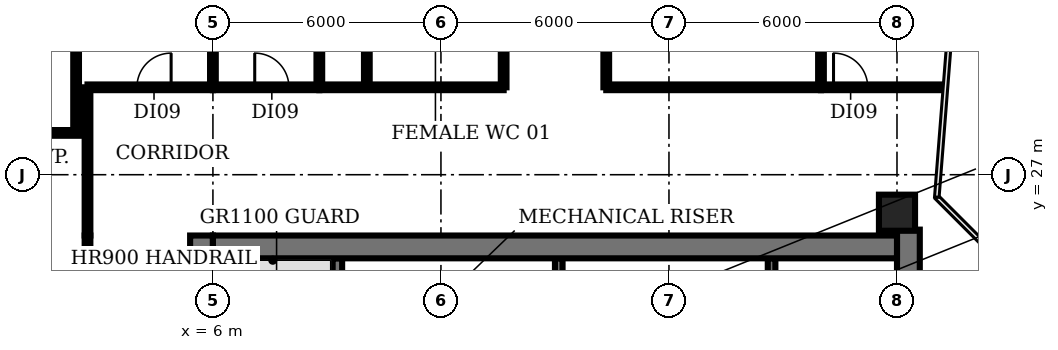
"""IFC4 building model, lengths in metres.
Left out: names, types, materials, properties, quantities, classifications, styles, units other than length and angle.
Written with IfcOpenShell. Run it as: python <this file> out.ifc"""

import sys

from ifc_helpers import new_model, si_unit, direction, frame, frame_2d, origin, origin_2d, place, context, subcontext, project, spatial, rectangle, circle, extrude, element, fill, save


model = new_model("IFC4")
c1 = context("Model", 3, precision=1e-05, world=origin(), true_north=direction((0.0, 1.0)))
c2 = subcontext(c1, "Body", "Model", "MODEL_VIEW")
j1 = project(units=[si_unit("LENGTHUNIT", "METRE"), si_unit("PLANEANGLEUNIT", "RADIAN")], contexts=[c1])
p1 = place(None, origin())
s1 = spatial("IfcSite", under=j1, at=p1, CompositionType="ELEMENT")
p2 = place(p1, origin())
s2 = spatial("IfcBuilding", under=s1, at=p2, CompositionType="ELEMENT")
p3 = place(p2, frame((0.0, 0.0, 150.8)))
s3 = spatial("IfcBuildingStorey", under=s2, at=p3, CompositionType="ELEMENT", Elevation=150.8)
p4 = place(p3, frame((24.0, 26.0, 0.0), z_axis=(0.0, 0.0, 1.0), x_axis=(1.0, 0.0, 0.0)))
e1 = element("IfcColumn", 1, at=p4, inside=s3, PredefinedType="COLUMN", context=c2, shape_type="SweptSolid", body=[
    extrude(circle(Radius=0.475, at=origin_2d()), origin(), (0.0, 0.0, 1.0), 3.85),
])
p5 = place(p3, frame((9.275, 18.375, 0.0), z_axis=(0.0, 0.0, 1.0), x_axis=(0.0, 1.0, 0.0)))
e2 = element("IfcWall", 2, at=p5, inside=s3, PredefinedType="SHEAR", context=c2, shape_type="SweptSolid", body=[
    extrude(rectangle(XDim=6.425, YDim=0.25, at=frame_2d((3.212, 0.0))), origin(), (0.0, 0.0, 1.0), 3.85),
])
for number, where, z_axis, x_axis in (
    (3, (15.1, 22.9, 0.0), (0.0, 0.0, 1.0), (0.0, 1.0, 0.0)),
    (4, (20.7, 22.9, 0.0), (0.0, 0.0, 1.0), (0.0, 1.0, 0.0)),
):
    element("IfcWall", number, at=place(p3, frame(where, z_axis=z_axis, x_axis=x_axis)), inside=s3, PredefinedType="SHEAR", context=c2, shape_type="SweptSolid", body=[
        extrude(rectangle(XDim=1.9, YDim=0.2, at=frame_2d((0.95, 0.0))), origin(), (0.0, 0.0, 1.0), 3.85),
    ])
p6 = place(p3, frame((5.7, 4.8, 0.0), z_axis=(0.0, 0.0, 1.0), x_axis=(0.0, 1.0, 0.0)))
e5 = element("IfcWall", 5, at=p6, inside=s3, PredefinedType="SHEAR", context=c2, shape_type="SweptSolid", body=[
    extrude(rectangle(XDim=20.6, YDim=0.6, at=frame_2d((10.3, 0.0))), origin(), (0.0, 0.0, 1.0), 3.85),
])
p7 = place(p6, frame((0.85, 0.0, 0.0)))
e6 = element("IfcOpeningElement", 6, at=p7, cuts=e5, PredefinedType="OPENING", context=c2, shape_type="SweptSolid", body=[
    extrude(rectangle(XDim=1.5, YDim=2.1, at=frame_2d((0.75, 1.05))), frame((0.0, 0.31, 0.0), z_axis=(0.0, -1.0, 0.0), x_axis=(1.0, 0.0, 0.0)), (0.0, 0.0, 1.0), 0.62),
])
p8 = place(p6, frame((7.3, 0.0, 0.0)))
e7 = element("IfcOpeningElement", 7, at=p8, cuts=e5, PredefinedType="OPENING", context=c2, shape_type="SweptSolid", body=[
    extrude(rectangle(XDim=1.2, YDim=2.1, at=frame_2d((0.6, 1.05))), frame((0.0, 0.31, 0.0), z_axis=(0.0, -1.0, 0.0), x_axis=(1.0, 0.0, 0.0)), (0.0, 0.0, 1.0), 0.62),
])
p9 = place(p6, frame((13.85, 0.0, 0.0)))
e8 = element("IfcOpeningElement", 8, at=p9, cuts=e5, PredefinedType="OPENING", context=c2, shape_type="SweptSolid", body=[
    extrude(rectangle(XDim=1.2, YDim=2.1, at=frame_2d((0.6, 1.05))), frame((0.0, 0.31, 0.0), z_axis=(0.0, -1.0, 0.0), x_axis=(1.0, 0.0, 0.0)), (0.0, 0.0, 1.0), 0.62),
])
p10 = place(p3, frame((24.3, 25.555, 0.0), z_axis=(0.0, 0.0, 1.0), x_axis=(0.0, -1.0, 0.0)))
e9 = element("IfcWall", 9, at=p10, inside=s3, PredefinedType="SHEAR", context=c2, shape_type="SweptSolid", body=[
    extrude(rectangle(XDim=20.755, YDim=0.6, at=frame_2d((10.377, 0.0))), origin(), (0.0, 0.0, 1.0), 3.85),
])
p11 = place(p10, frame((18.405, 0.0, 0.0)))
e10 = element("IfcOpeningElement", 10, at=p11, cuts=e9, PredefinedType="OPENING", context=c2, shape_type="SweptSolid", body=[
    extrude(rectangle(XDim=1.5, YDim=2.1, at=frame_2d((0.75, 1.05))), frame((0.0, 0.31, 0.0), z_axis=(0.0, -1.0, 0.0), x_axis=(1.0, 0.0, 0.0)), (0.0, 0.0, 1.0), 0.62),
])
p12 = place(p10, frame((12.305, 0.0, 0.0)))
e11 = element("IfcOpeningElement", 11, at=p12, cuts=e9, PredefinedType="OPENING", context=c2, shape_type="SweptSolid", body=[
    extrude(rectangle(XDim=0.9, YDim=2.1, at=frame_2d((0.45, 1.05))), frame((0.0, 0.31, 0.0), z_axis=(0.0, -1.0, 0.0), x_axis=(1.0, 0.0, 0.0)), (0.0, 0.0, 1.0), 0.62),
])
p13 = place(p10, frame((6.305, 0.0, 0.0)))
e12 = element("IfcOpeningElement", 12, at=p13, cuts=e9, PredefinedType="OPENING", context=c2, shape_type="SweptSolid", body=[
    extrude(rectangle(XDim=2.0, YDim=2.1, at=frame_2d((1.0, 1.05))), frame((0.0, 0.31, 0.0), z_axis=(0.0, -1.0, 0.0), x_axis=(1.0, 0.0, 0.0)), (0.0, 0.0, 1.0), 0.62),
])
p14 = place(p3, frame((6.0, 25.1, 0.0), z_axis=(0.0, 0.0, 1.0), x_axis=(1.0, 0.0, 0.0)))
e13 = element("IfcWall", 13, at=p14, inside=s3, PredefinedType="SHEAR", context=c2, shape_type="SweptSolid", body=[
    extrude(rectangle(XDim=18.0, YDim=0.6, at=frame_2d((9.0, 0.0))), origin(), (0.0, 0.0, 1.0), 3.85),
])
p15 = place(p3, frame((-0.98, 28.1, 0.0), z_axis=(0.0, 0.0, 1.0), x_axis=(1.0, 0.0, 0.0)))
e14 = element("IfcWall", 14, at=p15, inside=s3, PredefinedType="PARTITIONING", context=c2, shape_type="SweptSolid", body=[
    extrude(rectangle(XDim=3.68, YDim=0.15, at=frame_2d((1.84, 0.0))), origin(), (0.0, 0.0, 1.0), 2.88),
])
p16 = place(p3, frame((2.4, 28.1, 0.0), z_axis=(0.0, 0.0, 1.0), x_axis=(0.0, 1.0, 0.0)))
e15 = element("IfcWall", 15, at=p16, inside=s3, PredefinedType="PARTITIONING", context=c2, shape_type="SweptSolid", body=[
    extrude(rectangle(XDim=6.0, YDim=0.15, at=frame_2d((3.0, 0.0))), origin(), (0.0, 0.0, 1.0), 2.88),
])
p17 = place(p3, frame((2.7, 4.8, 0.0), z_axis=(0.0, 0.0, 1.0), x_axis=(0.0, 1.0, 0.0)))
e16 = element("IfcWall", 16, at=p17, inside=s3, PredefinedType="PARTITIONING", context=c2, shape_type="SweptSolid", body=[
    extrude(rectangle(XDim=20.6, YDim=0.15, at=frame_2d((10.3, 0.0))), origin(), (0.0, 0.0, 1.0), 2.88),
])
p18 = place(p17, frame((10.2, 0.0, 0.0)))
e17 = element("IfcOpeningElement", 17, at=p18, cuts=e16, PredefinedType="OPENING", context=c2, shape_type="SweptSolid", body=[
    extrude(rectangle(XDim=1.2, YDim=2.1, at=frame_2d((0.6, 1.05))), frame((0.0, 0.085, 0.0), z_axis=(0.0, -1.0, 0.0), x_axis=(1.0, 0.0, 0.0)), (0.0, 0.0, 1.0), 0.17),
])
p19 = place(p3, frame((2.7, 25.4, 0.0), z_axis=(0.0, 0.0, 1.0), x_axis=(0.0, 1.0, 0.0)))
e18 = element("IfcWall", 18, at=p19, inside=s3, PredefinedType="PARTITIONING", context=c2, shape_type="SweptSolid", body=[
    extrude(rectangle(XDim=3.9, YDim=0.15, at=frame_2d((1.95, 0.0))), origin(), (0.0, 0.0, 1.0), 2.88),
])
p20 = place(p3, frame((2.7, 29.3, 0.0), z_axis=(0.0, 0.0, 1.0), x_axis=(1.0, 0.0, 0.0)))
e19 = element("IfcWall", 19, at=p20, inside=s3, PredefinedType="PARTITIONING", context=c2, shape_type="SweptSolid", body=[
    extrude(rectangle(XDim=3.3, YDim=0.15, at=frame_2d((1.65, 0.0))), origin(), (0.0, 0.0, 1.0), 2.88),
])
p21 = place(p20, frame((1.3, 0.0, 0.0)))
e20 = element("IfcOpeningElement", 20, at=p21, cuts=e19, PredefinedType="OPENING", context=c2, shape_type="SweptSolid", body=[
    extrude(rectangle(XDim=0.9, YDim=2.1, at=frame_2d((0.45, 1.05))), frame((0.0, 0.085, 0.0), z_axis=(0.0, -1.0, 0.0), x_axis=(1.0, 0.0, 0.0)), (0.0, 0.0, 1.0), 0.17),
])
p22 = place(p3, frame((6.0, 29.3, 0.0), z_axis=(0.0, 0.0, 1.0), x_axis=(0.0, 1.0, 0.0)))
e21 = element("IfcWall", 21, at=p22, inside=s3, PredefinedType="PARTITIONING", context=c2, shape_type="SweptSolid", body=[
    extrude(rectangle(XDim=4.8, YDim=0.15, at=frame_2d((2.4, 0.0))), origin(), (0.0, 0.0, 1.0), 2.88),
])
p23 = place(p3, frame((6.0, 29.3, 0.0), z_axis=(0.0, 0.0, 1.0), x_axis=(1.0, 0.0, 0.0)))
e22 = element("IfcWall", 22, at=p23, inside=s3, PredefinedType="PARTITIONING", context=c2, shape_type="SweptSolid", body=[
    extrude(rectangle(XDim=2.8, YDim=0.15, at=frame_2d((1.4, 0.0))), origin(), (0.0, 0.0, 1.0), 2.88),
])
p24 = place(p23, frame((1.1, 0.0, 0.0)))
e23 = element("IfcOpeningElement", 23, at=p24, cuts=e22, PredefinedType="OPENING", context=c2, shape_type="SweptSolid", body=[
    extrude(rectangle(XDim=0.9, YDim=2.1, at=frame_2d((0.45, 1.05))), frame((0.0, 0.085, 0.0), z_axis=(0.0, -1.0, 0.0), x_axis=(1.0, 0.0, 0.0)), (0.0, 0.0, 1.0), 0.17),
])
p25 = place(p3, frame((8.8, 29.3, 0.0), z_axis=(0.0, 0.0, 1.0), x_axis=(0.0, 1.0, 0.0)))
e24 = element("IfcWall", 24, at=p25, inside=s3, PredefinedType="PARTITIONING", context=c2, shape_type="SweptSolid", body=[
    extrude(rectangle(XDim=4.8, YDim=0.15, at=frame_2d((2.4, 0.0))), origin(), (0.0, 0.0, 1.0), 2.88),
])
p26 = place(p3, frame((8.8, 29.3, 0.0), z_axis=(0.0, 0.0, 1.0), x_axis=(1.0, 0.0, 0.0)))
e25 = element("IfcWall", 25, at=p26, inside=s3, PredefinedType="PARTITIONING", context=c2, shape_type="SweptSolid", body=[
    extrude(rectangle(XDim=4.85, YDim=0.15, at=frame_2d((2.425, 0.0))), origin(), (0.0, 0.0, 1.0), 2.88),
])
p27 = place(p3, frame((10.05, 29.3, 0.0), z_axis=(0.0, 0.0, 1.0), x_axis=(0.0, 1.0, 0.0)))
e26 = element("IfcWall", 26, at=p27, inside=s3, PredefinedType="PARTITIONING", context=c2, shape_type="SweptSolid", body=[
    extrude(rectangle(XDim=4.8, YDim=0.15, at=frame_2d((2.4, 0.0))), origin(), (0.0, 0.0, 1.0), 2.88),
])
p28 = place(p3, frame((13.65, 29.3, 0.0), z_axis=(0.0, 0.0, 1.0), x_axis=(0.0, 1.0, 0.0)))
e27 = element("IfcWall", 27, at=p28, inside=s3, PredefinedType="PARTITIONING", context=c2, shape_type="SweptSolid", body=[
    extrude(rectangle(XDim=4.8, YDim=0.15, at=frame_2d((2.4, 0.0))), origin(), (0.0, 0.0, 1.0), 2.88),
])
p29 = place(p28, frame((1.9, 0.0, 0.0)))
e28 = element("IfcOpeningElement", 28, at=p29, cuts=e27, PredefinedType="OPENING", context=c2, shape_type="SweptSolid", body=[
    extrude(rectangle(XDim=0.9, YDim=2.1, at=frame_2d((0.45, 1.05))), frame((0.0, 0.085, 0.0), z_axis=(0.0, -1.0, 0.0), x_axis=(1.0, 0.0, 0.0)), (0.0, 0.0, 1.0), 0.17),
])
p30 = place(p3, frame((16.35, 29.3, 0.0), z_axis=(0.0, 0.0, 1.0), x_axis=(0.0, 1.0, 0.0)))
e29 = element("IfcWall", 29, at=p30, inside=s3, PredefinedType="PARTITIONING", context=c2, shape_type="SweptSolid", body=[
    extrude(rectangle(XDim=4.8, YDim=0.15, at=frame_2d((2.4, 0.0))), origin(), (0.0, 0.0, 1.0), 2.88),
])
p31 = place(p3, frame((16.35, 29.3, 0.0), z_axis=(0.0, 0.0, 1.0), x_axis=(1.0, 0.0, 0.0)))
e30 = element("IfcWall", 30, at=p31, inside=s3, PredefinedType="PARTITIONING", context=c2, shape_type="SweptSolid", body=[
    extrude(rectangle(XDim=5.65, YDim=0.15, at=frame_2d((2.825, 0.0))), origin(), (0.0, 0.0, 1.0), 2.88),
])
p32 = place(p3, frame((22.0, 29.3, 0.0), z_axis=(0.0, 0.0, 1.0), x_axis=(0.0, 1.0, 0.0)))
e31 = element("IfcWall", 31, at=p32, inside=s3, PredefinedType="PARTITIONING", context=c2, shape_type="SweptSolid", body=[
    extrude(rectangle(XDim=4.8, YDim=0.15, at=frame_2d((2.4, 0.0))), origin(), (0.0, 0.0, 1.0), 2.88),
])
p33 = place(p3, frame((22.0, 29.3, 0.0), z_axis=(0.0, 0.0, 1.0), x_axis=(1.0, 0.0, 0.0)))
e32 = element("IfcWall", 32, at=p33, inside=s3, PredefinedType="PARTITIONING", context=c2, shape_type="SweptSolid", body=[
    extrude(rectangle(XDim=3.23, YDim=0.15, at=frame_2d((1.615, 0.0))), origin(), (0.0, 0.0, 1.0), 2.88),
])
p34 = place(p33, frame((0.33, 0.0, 0.0)))
e33 = element("IfcOpeningElement", 33, at=p34, cuts=e32, PredefinedType="OPENING", context=c2, shape_type="SweptSolid", body=[
    extrude(rectangle(XDim=0.9, YDim=2.1, at=frame_2d((0.45, 1.05))), frame((0.0, 0.085, 0.0), z_axis=(0.0, -1.0, 0.0), x_axis=(1.0, 0.0, 0.0)), (0.0, 0.0, 1.0), 0.17),
])
p35 = place(p21, origin())
e34 = element("IfcDoor", 34, at=p35, inside=s3, OperationType="SINGLE_SWING_RIGHT", PredefinedType="DOOR", context=c2, shape_type="SweptSolid", body=[
    extrude(rectangle(XDim=0.9, YDim=2.1, at=frame_2d((0.45, 1.05))), frame((0.0, 0.025, 0.0), z_axis=(0.0, -1.0, 0.0), x_axis=(1.0, 0.0, 0.0)), (0.0, 0.0, 1.0), 0.05),
])
fill(e20, e34)
p36 = place(p24, origin())
e35 = element("IfcDoor", 35, at=p36, inside=s3, OperationType="SINGLE_SWING_LEFT", PredefinedType="DOOR", context=c2, shape_type="SweptSolid", body=[
    extrude(rectangle(XDim=0.9, YDim=2.1, at=frame_2d((0.45, 1.05))), frame((0.0, 0.025, 0.0), z_axis=(0.0, -1.0, 0.0), x_axis=(1.0, 0.0, 0.0)), (0.0, 0.0, 1.0), 0.05),
])
fill(e23, e35)
p37 = place(p34, origin())
e36 = element("IfcDoor", 36, at=p37, inside=s3, OperationType="SINGLE_SWING_LEFT", PredefinedType="DOOR", context=c2, shape_type="SweptSolid", body=[
    extrude(rectangle(XDim=0.9, YDim=2.1, at=frame_2d((0.45, 1.05))), frame((0.0, 0.025, 0.0), z_axis=(0.0, -1.0, 0.0), x_axis=(1.0, 0.0, 0.0)), (0.0, 0.0, 1.0), 0.05),
])
fill(e33, e36)
save(model, sys.argv[1])
